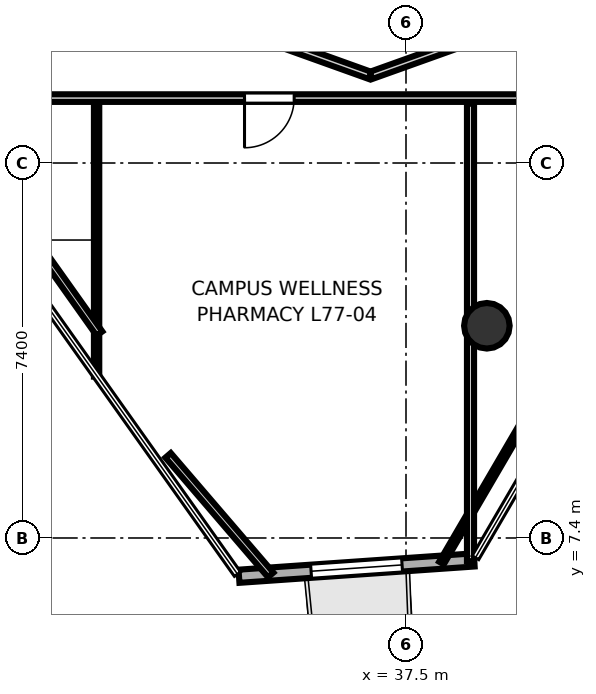
"""IFC4 building model, lengths in metres.
Left out: names, types, materials, properties, quantities, classifications, styles, units other than length and angle.
Written with IfcOpenShell. Run it as: python <this file> out.ifc"""

import sys

from ifc_helpers import new_model, si_unit, direction, frame, frame_2d, origin, origin_2d, place, context, subcontext, project, spatial, rectangle, hollow_circle, extrude, element, fill, save


model = new_model("IFC4")
c1 = context("Model", 3, precision=1e-05, world=origin(), true_north=direction((0.0, 1.0)))
c2 = subcontext(c1, "Body", "Model", "MODEL_VIEW")
j1 = project(units=[si_unit("LENGTHUNIT", "METRE"), si_unit("PLANEANGLEUNIT", "RADIAN")], contexts=[c1])
p1 = place(None, origin())
s1 = spatial("IfcSite", under=j1, at=p1, CompositionType="ELEMENT")
p2 = place(p1, origin())
s2 = spatial("IfcBuilding", under=s1, at=p2, CompositionType="ELEMENT")
p3 = place(p2, frame((0.0, 0.0, 299.1)))
s3 = spatial("IfcBuildingStorey", under=s2, at=p3, CompositionType="ELEMENT", Elevation=299.1)
p4 = place(p3, frame((39.096, 11.588, 0.0), z_axis=(0.0, 0.0, 1.0), x_axis=(1.0, 0.0, 0.0)))
e1 = element("IfcColumn", 1, at=p4, inside=s3, PredefinedType="COLUMN", context=c2, shape_type="SweptSolid", body=[
    extrude(hollow_circle(Radius=0.45, WallThickness=0.025, at=origin_2d()), origin(), (0.0, 0.0, 1.0), 3.7),
])
p5 = place(p3, frame((34.204, 6.645, 0.0), z_axis=(0.0, 0.0, 1.0), x_axis=(0.997598176449, 0.069266718895, 0.0)))
e2 = element("IfcWall", 2, at=p5, inside=s3, PredefinedType="SOLIDWALL", context=c2, shape_type="SweptSolid", body=[
    extrude(rectangle(XDim=4.653, YDim=0.26, at=frame_2d((2.326, 0.0))), origin(), (0.0, 0.0, 1.0), 3.52),
])
p6 = place(p5, frame((1.426, 0.0, 0.85)))
e3 = element("IfcOpeningElement", 3, at=p6, cuts=e2, PredefinedType="OPENING", context=c2, shape_type="SweptSolid", body=[
    extrude(rectangle(XDim=1.8, YDim=2.1, at=frame_2d((0.9, 1.05))), frame((0.0, 0.14, 0.0), z_axis=(0.0, -1.0, 0.0), x_axis=(1.0, 0.0, 0.0)), (0.0, 0.0, 1.0), 0.28),
])
p7 = place(p3, frame((33.458, 17.724, 0.0), z_axis=(0.0, 0.0, 1.0), x_axis=(0.94128854789, -0.337603124408, 0.0)))
e4 = element("IfcWall", 4, at=p7, inside=s3, PredefinedType="PARTITIONING", context=c2, shape_type="SweptSolid", body=[
    extrude(rectangle(XDim=3.54, YDim=0.15, at=frame_2d((1.77, 0.0))), origin(), (0.0, 0.0, 1.0), 2.84),
])
p8 = place(p3, frame((36.81, 16.529, 0.0), z_axis=(0.0, 0.0, 1.0), x_axis=(0.941548344365, 0.33687789364, 0.0)))
e5 = element("IfcWall", 5, at=p8, inside=s3, PredefinedType="PARTITIONING", context=c2, shape_type="SweptSolid", body=[
    extrude(rectangle(XDim=3.513, YDim=0.15, at=frame_2d((1.756, 0.0))), origin(), (0.0, 0.0, 1.0), 2.84),
])
p9 = place(p3, frame((42.65, 16.081, 0.0), z_axis=(0.0, 0.0, 1.0), x_axis=(-1.0, 0.0, 0.0)))
e6 = element("IfcWall", 6, at=p9, inside=s3, PredefinedType="PARTITIONING", context=c2, shape_type="SweptSolid", body=[
    extrude(rectangle(XDim=12.85, YDim=0.15, at=frame_2d((6.425, 0.0))), origin(), (0.0, 0.0, 1.0), 2.84),
])
p10 = place(p9, frame((7.357, 0.0, 0.0)))
e7 = element("IfcOpeningElement", 7, at=p10, cuts=e6, PredefinedType="OPENING", context=c2, shape_type="SweptSolid", body=[
    extrude(rectangle(XDim=0.98, YDim=2.1, at=frame_2d((0.49, 1.05))), frame((0.0, 0.085, 0.0), z_axis=(0.0, -1.0, 0.0), x_axis=(1.0, 0.0, 0.0)), (0.0, 0.0, 1.0), 0.17),
])
p11 = place(p3, frame((31.394, 15.975, 0.0), z_axis=(0.0, 0.0, 1.0), x_axis=(0.0, -1.0, 0.0)))
e8 = element("IfcWall", 8, at=p11, inside=s3, PredefinedType="PARTITIONING", context=c2, shape_type="SweptSolid", body=[
    extrude(rectangle(XDim=5.39, YDim=0.105, at=frame_2d((2.695, 0.0))), origin(), (0.0, 0.0, 1.0), 2.84),
])
p12 = place(p3, frame((31.45, 11.435, 0.0), z_axis=(0.0, 0.0, 1.0), x_axis=(-0.578718901732, 0.815527088929, 0.0)))
e9 = element("IfcWall", 9, at=p12, inside=s3, PredefinedType="PARTITIONING", context=c2, shape_type="SweptSolid", body=[
    extrude(rectangle(XDim=9.691, YDim=0.14, at=frame_2d((4.846, 0.0))), origin(), (0.0, 0.0, 1.0), 2.84),
])
p13 = place(p3, frame((55.938, 37.275, 0.0), z_axis=(0.0, 0.0, 1.0), x_axis=(-0.504337097155, -0.863506857201, 0.0)))
e10 = element("IfcWall", 10, at=p13, inside=s3, PredefinedType="PARTITIONING", context=c2, shape_type="SweptSolid", body=[
    extrude(rectangle(XDim=35.169, YDim=0.105, at=frame_2d((17.585, 0.0))), origin(), (0.0, 0.0, 1.0), 2.84),
])
p14 = place(p3, frame((38.773, 6.942, 0.0), z_axis=(0.0, 0.0, 1.0), x_axis=(0.0, 1.0, 0.0)))
e11 = element("IfcWall", 11, at=p14, inside=s3, PredefinedType="PARTITIONING", context=c2, shape_type="SweptSolid", body=[
    extrude(rectangle(XDim=9.028, YDim=0.14, at=frame_2d((4.514, 0.0))), origin(), (0.0, 0.0, 1.0), 2.84),
])
p15 = place(p3, frame((34.83, 6.671, 0.0), z_axis=(0.0, 0.0, 1.0), x_axis=(-0.651243792688, 0.75886858051, 0.0)))
e12 = element("IfcWall", 12, at=p15, inside=s3, PredefinedType="PARTITIONING", context=c2, shape_type="SweptSolid", body=[
    extrude(rectangle(XDim=3.11, YDim=0.14, at=frame_2d((1.555, 0.0))), origin(), (0.0, 0.0, 1.0), 2.84),
])
p16 = place(p10, origin())
e13 = element("IfcDoor", 13, at=p16, inside=s3, OperationType="SINGLE_SWING_RIGHT", PredefinedType="DOOR", context=c2, shape_type="SweptSolid", body=[
    extrude(rectangle(XDim=0.98, YDim=2.1, at=frame_2d((0.49, 1.05))), frame((0.0, 0.025, 0.0), z_axis=(0.0, -1.0, 0.0), x_axis=(1.0, 0.0, 0.0)), (0.0, 0.0, 1.0), 0.05),
])
fill(e7, e13)
p17 = place(p6, origin())
e14 = element("IfcWindow", 14, at=p17, inside=s3, PartitioningType="SINGLE_PANEL", PredefinedType="WINDOW", context=c2, shape_type="SweptSolid", body=[
    extrude(rectangle(XDim=1.8, YDim=2.1, at=frame_2d((0.9, 1.05))), frame((0.0, 0.03, 0.0), z_axis=(0.0, -1.0, 0.0), x_axis=(1.0, 0.0, 0.0)), (0.0, 0.0, 1.0), 0.06),
])
fill(e3, e14)
save(model, sys.argv[1])
